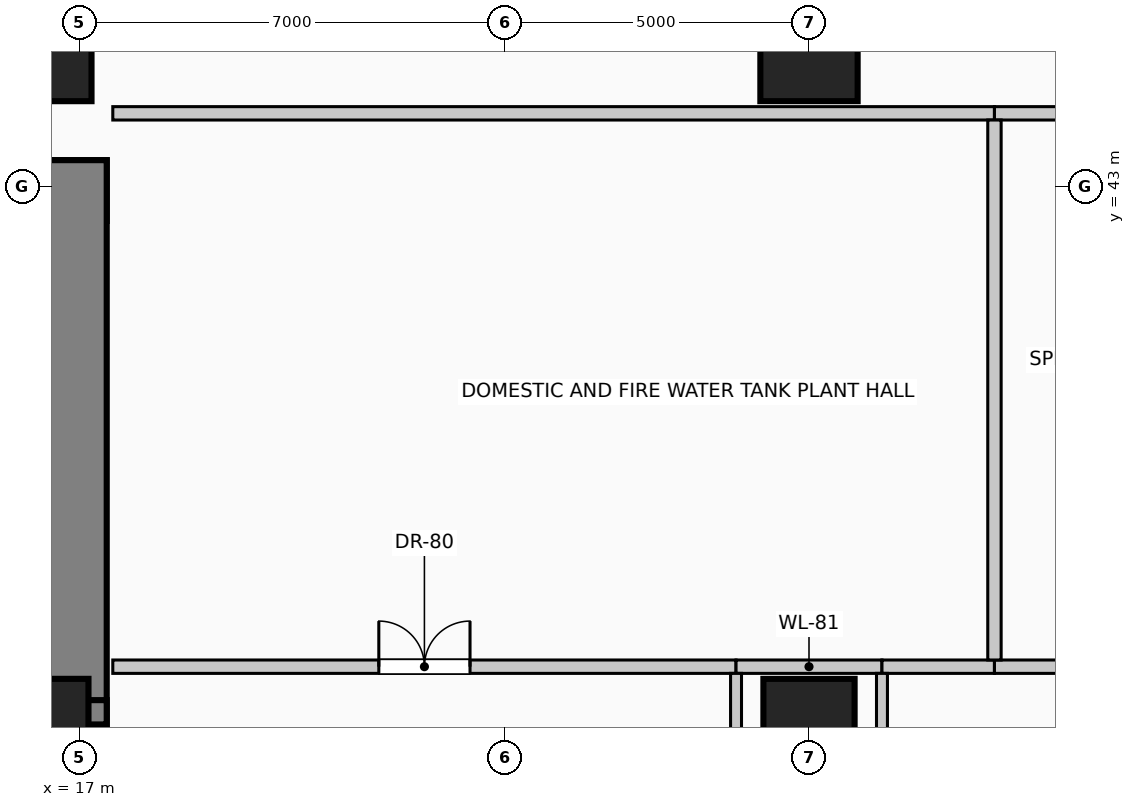
"""IFC4 building model, lengths in metres.
Left out: names, types, materials, properties, quantities, classifications, styles, units other than length and angle.
Written with IfcOpenShell. Run it as: python <this file> out.ifc"""

import sys

from ifc_helpers import new_model, si_unit, direction, frame, frame_2d, origin, origin_2d, place, context, subcontext, project, spatial, rectangle, extrude, element, fill, save


model = new_model("IFC4")
c1 = context("Model", 3, precision=1e-05, world=origin(), true_north=direction((0.0, 1.0)))
c2 = subcontext(c1, "Body", "Model", "MODEL_VIEW")
j1 = project(units=[si_unit("LENGTHUNIT", "METRE"), si_unit("PLANEANGLEUNIT", "RADIAN")], contexts=[c1])
p1 = place(None, origin())
s1 = spatial("IfcSite", under=j1, at=p1, CompositionType="ELEMENT")
p2 = place(p1, origin())
s2 = spatial("IfcBuilding", under=s1, at=p2, CompositionType="ELEMENT")
p3 = place(p2, frame((0.0, 0.0, -9.0)))
s3 = spatial("IfcBuildingStorey", under=s2, at=p3, CompositionType="ELEMENT", Elevation=-9.0)
p4 = place(p3, frame((2.55, 42.93, 0.0), z_axis=(0.0, 0.0, 1.0), x_axis=(1.0, 0.0, 0.0)))
e1 = element("IfcWall", 1, at=p4, inside=s3, PredefinedType="SHEAR", context=c2, shape_type="SweptSolid", body=[
    extrude(rectangle(XDim=14.9, YDim=1.0, at=frame_2d((7.45, 0.0))), origin(), (0.0, 0.0, 1.0), 4.5),
])
p5 = place(p3, frame((16.95, 34.15, 0.0), z_axis=(0.0, 0.0, 1.0), x_axis=(0.0, 1.0, 0.0)))
e2 = element("IfcWall", 2, at=p5, inside=s3, PredefinedType="SHEAR", context=c2, shape_type="SweptSolid", body=[
    extrude(rectangle(XDim=9.28, YDim=1.0, at=frame_2d((4.64, 0.0))), origin(), (0.0, 0.0, 1.0), 4.5),
])
p6 = place(p3, frame((12.29, 34.35, 0.0), z_axis=(0.0, 0.0, 1.0), x_axis=(1.0, 0.0, 0.0)))
e3 = element("IfcWall", 3, at=p6, inside=s3, PredefinedType="SHEAR", context=c2, shape_type="SweptSolid", body=[
    extrude(rectangle(XDim=5.16, YDim=0.4, at=frame_2d((2.58, 0.0))), origin(), (0.0, 0.0, 1.0), 4.5),
])
p7 = place(p6, frame((1.4, 0.0, 0.0)))
e4 = element("IfcOpeningElement", 4, at=p7, cuts=e3, PredefinedType="OPENING", context=c2, shape_type="SweptSolid", body=[
    extrude(rectangle(XDim=1.15, YDim=2.2, at=frame_2d((0.575, 1.1))), frame((0.0, 0.21, 0.0), z_axis=(0.0, -1.0, 0.0), x_axis=(1.0, 0.0, 0.0)), (0.0, 0.0, 1.0), 0.42),
])
for number, where, z_axis, x_axis in (
    (5, (16.4, 45.4, 0.0), (0.0, 0.0, 1.0), (1.0, 0.0, 0.0)),
    (6, (29.0, 45.4, 0.0), (0.0, 0.0, 1.0), (1.0, 0.0, 0.0)),
):
    element("IfcColumn", number, at=place(p3, frame(where, z_axis=z_axis, x_axis=x_axis)), inside=s3, PredefinedType="COLUMN", context=c2, shape_type="SweptSolid", body=[
        extrude(rectangle(XDim=1.6, YDim=2.0, at=origin_2d()), origin(), (0.0, 0.0, 1.0), 4.5),
    ])
for number, where, z_axis, x_axis in (
    (7, (16.4, 34.0, 0.0), (0.0, 0.0, 1.0), (1.0, 0.0, 0.0)),
    (8, (29.0, 34.0, 0.0), (0.0, 0.0, 1.0), (1.0, 0.0, 0.0)),
):
    element("IfcColumn", number, at=place(p3, frame(where, z_axis=z_axis, x_axis=x_axis)), inside=s3, PredefinedType="COLUMN", context=c2, shape_type="SweptSolid", body=[
        extrude(rectangle(XDim=1.5, YDim=1.8, at=origin_2d()), origin(), (0.0, 0.0, 1.0), 4.5),
    ])
p8 = place(p3, frame((17.55, 35.1, 0.0), z_axis=(0.0, 0.0, 1.0), x_axis=(1.0, 0.0, 0.0)))
e9 = element("IfcWall", 9, at=p8, inside=s3, PredefinedType="PARTITIONING", context=c2, shape_type="SweptSolid", body=[
    extrude(rectangle(XDim=10.25, YDim=0.22, at=frame_2d((5.125, 0.0))), origin(), (0.0, 0.0, 1.0), 4.1),
])
p9 = place(p8, frame((4.375, 0.0, 0.0)))
e10 = element("IfcOpeningElement", 10, at=p9, cuts=e9, PredefinedType="OPENING", context=c2, shape_type="SweptSolid", body=[
    extrude(rectangle(XDim=1.5, YDim=2.25, at=frame_2d((0.75, 1.125))), frame((0.0, 0.12, 0.0), z_axis=(0.0, -1.0, 0.0), x_axis=(1.0, 0.0, 0.0)), (0.0, 0.0, 1.0), 0.24),
])
p10 = place(p3, frame((27.8, 35.1, 0.0), z_axis=(0.0, 0.0, 1.0), x_axis=(1.0, 0.0, 0.0)))
e11 = element("IfcWall", 11, at=p10, inside=s3, PredefinedType="PARTITIONING", context=c2, shape_type="SweptSolid", body=[
    extrude(rectangle(XDim=2.4, YDim=0.22, at=frame_2d((1.2, 0.0))), origin(), (0.0, 0.0, 1.0), 4.1),
])
p11 = place(p3, frame((30.2, 35.1, 0.0), z_axis=(0.0, 0.0, 1.0), x_axis=(1.0, 0.0, 0.0)))
e12 = element("IfcWall", 12, at=p11, inside=s3, PredefinedType="PARTITIONING", context=c2, shape_type="SweptSolid", body=[
    extrude(rectangle(XDim=1.85, YDim=0.22, at=frame_2d((0.925, 0.0))), origin(), (0.0, 0.0, 1.0), 4.1),
])
p12 = place(p3, frame((32.05, 35.1, 0.0), z_axis=(0.0, 0.0, 1.0), x_axis=(1.0, 0.0, 0.0)))
e13 = element("IfcWall", 13, at=p12, inside=s3, PredefinedType="PARTITIONING", context=c2, shape_type="SweptSolid", body=[
    extrude(rectangle(XDim=8.35, YDim=0.22, at=frame_2d((4.175, 0.0))), origin(), (0.0, 0.0, 1.0), 4.1),
])
p13 = place(p12, frame((3.425, 0.0, 0.0)))
e14 = element("IfcOpeningElement", 14, at=p13, cuts=e13, PredefinedType="OPENING", context=c2, shape_type="SweptSolid", body=[
    extrude(rectangle(XDim=1.5, YDim=2.25, at=frame_2d((0.75, 1.125))), frame((0.0, 0.12, 0.0), z_axis=(0.0, -1.0, 0.0), x_axis=(1.0, 0.0, 0.0)), (0.0, 0.0, 1.0), 0.24),
])
p14 = place(p3, frame((17.55, 44.2, 0.0), z_axis=(0.0, 0.0, 1.0), x_axis=(1.0, 0.0, 0.0)))
e15 = element("IfcWall", 15, at=p14, inside=s3, PredefinedType="PARTITIONING", context=c2, shape_type="SweptSolid", body=[
    extrude(rectangle(XDim=14.5, YDim=0.22, at=frame_2d((7.25, 0.0))), origin(), (0.0, 0.0, 1.0), 4.1),
])
p15 = place(p3, frame((32.05, 44.2, 0.0), z_axis=(0.0, 0.0, 1.0), x_axis=(1.0, 0.0, 0.0)))
e16 = element("IfcWall", 16, at=p15, inside=s3, PredefinedType="PARTITIONING", context=c2, shape_type="SweptSolid", body=[
    extrude(rectangle(XDim=8.35, YDim=0.22, at=frame_2d((4.175, 0.0))), origin(), (0.0, 0.0, 1.0), 4.1),
])
for number, where, z_axis, x_axis in (
    (17, (27.8, 32.44, 0.0), (0.0, 0.0, 1.0), (0.0, 1.0, 0.0)),
    (18, (30.2, 32.44, 0.0), (0.0, 0.0, 1.0), (0.0, 1.0, 0.0)),
):
    element("IfcWall", number, at=place(p3, frame(where, z_axis=z_axis, x_axis=x_axis)), inside=s3, PredefinedType="PARTITIONING", context=c2, shape_type="SweptSolid", body=[
        extrude(rectangle(XDim=2.55, YDim=0.18, at=frame_2d((1.275, 0.0))), origin(), (0.0, 0.0, 1.0), 4.1),
    ])
p16 = place(p3, frame((32.05, 35.21, 0.0), z_axis=(0.0, 0.0, 1.0), x_axis=(0.0, 1.0, 0.0)))
e19 = element("IfcWall", 19, at=p16, inside=s3, PredefinedType="PARTITIONING", context=c2, shape_type="SweptSolid", body=[
    extrude(rectangle(XDim=8.88, YDim=0.22, at=frame_2d((4.44, 0.0))), origin(), (0.0, 0.0, 1.0), 4.1),
])
p17 = place(p9, origin())
e20 = element("IfcDoor", 20, at=p17, inside=s3, OperationType="DOUBLE_DOOR_SINGLE_SWING", PredefinedType="DOOR", context=c2, shape_type="SweptSolid", body=[
    extrude(rectangle(XDim=1.5, YDim=2.25, at=frame_2d((0.75, 1.125))), frame((0.0, 0.025, 0.0), z_axis=(0.0, -1.0, 0.0), x_axis=(1.0, 0.0, 0.0)), (0.0, 0.0, 1.0), 0.05),
])
fill(e10, e20)
save(model, sys.argv[1])
